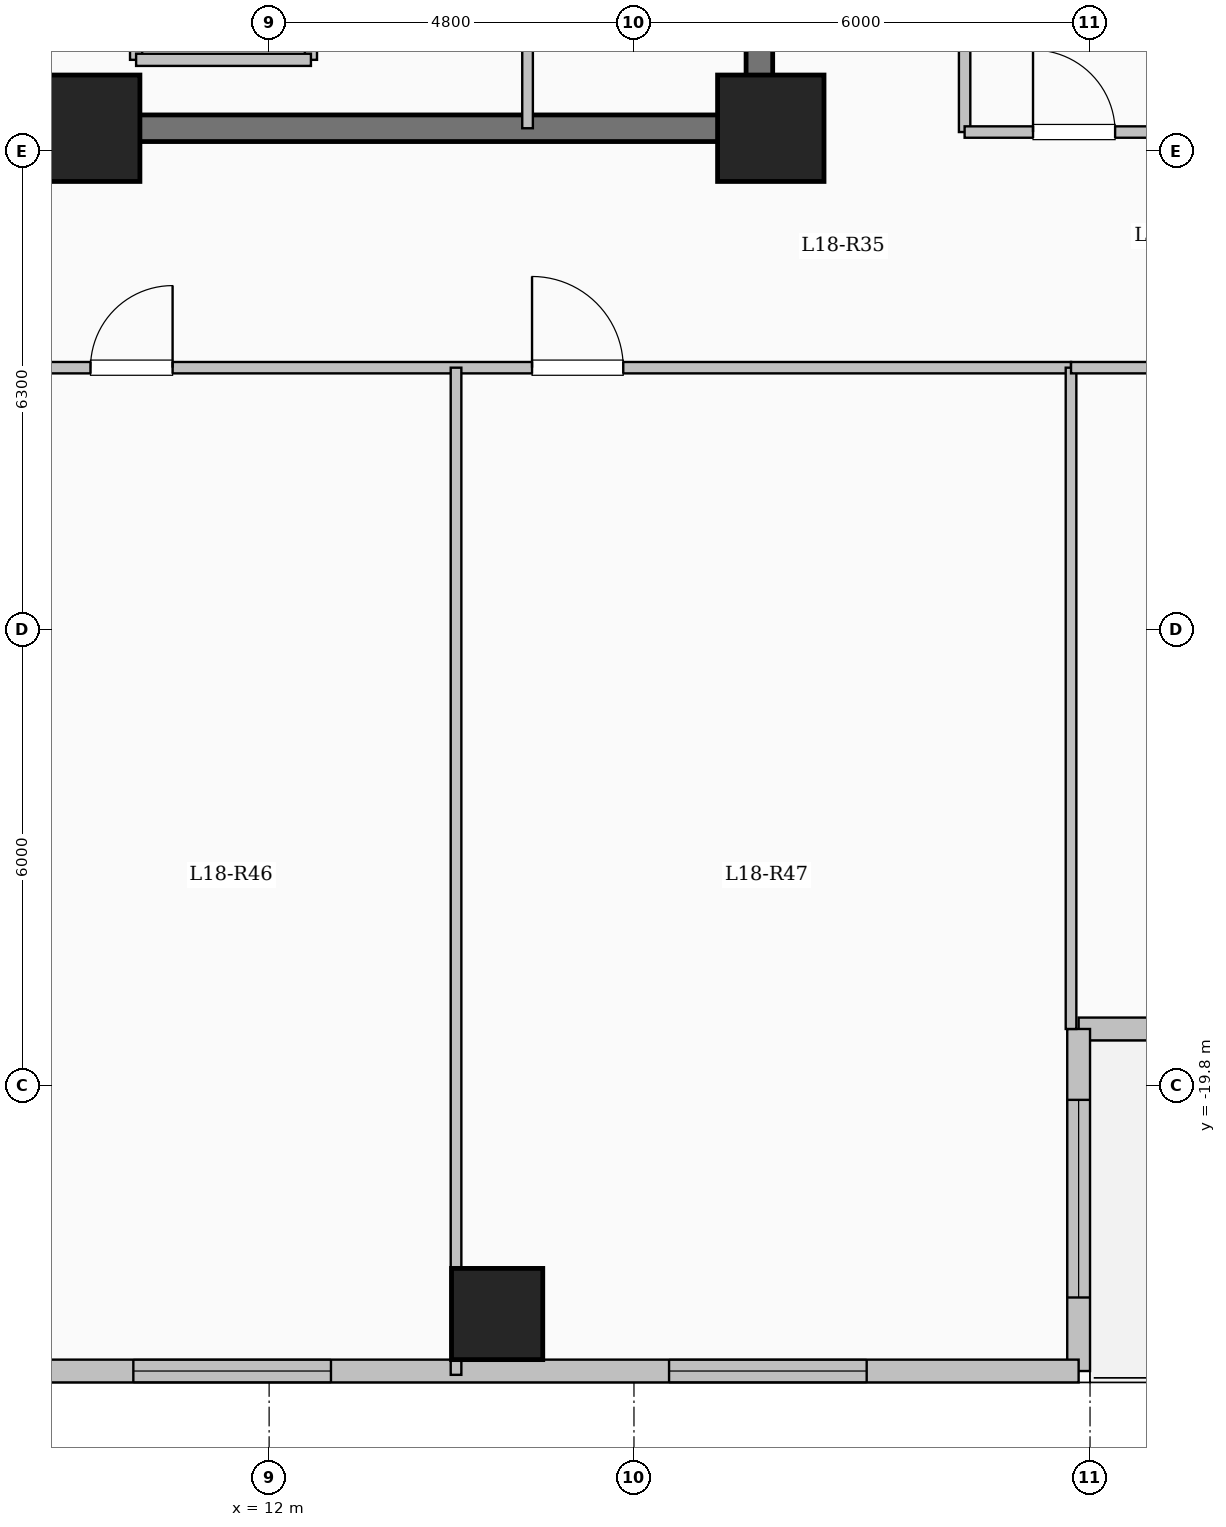
"""IFC4 building model, lengths in metres.
Left out: names, types, materials, properties, quantities, classifications, styles, units other than length and angle.
Written with IfcOpenShell. Run it as: python <this file> out.ifc"""

import sys

from ifc_helpers import new_model, si_unit, direction, frame, frame_2d, origin, origin_2d, place, context, subcontext, project, spatial, rectangle, extrude, element, fill, save


model = new_model("IFC4")
c1 = context("Model", 3, precision=1e-05, world=origin(), true_north=direction((0.0, 1.0)))
c2 = subcontext(c1, "Body", "Model", "MODEL_VIEW")
j1 = project(units=[si_unit("LENGTHUNIT", "METRE"), si_unit("PLANEANGLEUNIT", "RADIAN")], contexts=[c1])
p1 = place(None, origin())
s1 = spatial("IfcSite", under=j1, at=p1, CompositionType="ELEMENT")
p2 = place(p1, origin())
s2 = spatial("IfcBuilding", under=s1, at=p2, CompositionType="ELEMENT")
p3 = place(p2, frame((0.0, 0.0, 68.7)))
s3 = spatial("IfcBuildingStorey", under=s2, at=p3, CompositionType="ELEMENT", Elevation=68.7)
for number, where, z_axis, x_axis in (
    (1, (9.6, -7.2, 0.0), (0.0, 0.0, 1.0), (1.0, 0.0, 0.0)),
    (2, (18.6, -7.2, 0.0), (0.0, 0.0, 1.0), (1.0, 0.0, 0.0)),
):
    element("IfcColumn", number, at=place(p3, frame(where, z_axis=z_axis, x_axis=x_axis)), inside=s3, PredefinedType="COLUMN", context=c2, shape_type="SweptSolid", body=[
        extrude(rectangle(XDim=1.4, YDim=1.4, at=origin_2d()), origin(), (0.0, 0.0, 1.0), 4.5),
    ])
p4 = place(p3, frame((15.0, -22.8, 0.0), z_axis=(0.0, 0.0, 1.0), x_axis=(1.0, 0.0, 0.0)))
e3 = element("IfcColumn", 3, at=p4, inside=s3, PredefinedType="COLUMN", context=c2, shape_type="SweptSolid", body=[
    extrude(rectangle(XDim=1.2, YDim=1.2, at=origin_2d()), origin(), (0.0, 0.0, 1.0), 4.5),
])
p5 = place(p3, frame((28.65, -19.05, 0.0), z_axis=(0.0, 0.0, 1.0), x_axis=(-1.0, 0.0, 0.0)))
e4 = element("IfcWall", 4, at=p5, inside=s3, PredefinedType="SOLIDWALL", context=c2, shape_type="SweptSolid", body=[
    extrude(rectangle(XDim=6.0, YDim=0.3, at=frame_2d((3.0, 0.0))), origin(), (0.0, 0.0, 1.0), 4.2),
])
p6 = place(p5, frame((2.5, 0.0, 0.0)))
e5 = element("IfcOpeningElement", 5, at=p6, cuts=e4, PredefinedType="OPENING", context=c2, shape_type="SweptSolid", body=[
    extrude(rectangle(XDim=1.1, YDim=2.2, at=frame_2d((0.55, 1.1))), frame((0.0, 0.16, 0.0), z_axis=(0.0, -1.0, 0.0), x_axis=(1.0, 0.0, 0.0)), (0.0, 0.0, 1.0), 0.32),
])
p7 = place(p5, frame((0.755, 0.0, 0.95)))
e6 = element("IfcOpeningElement", 6, at=p7, cuts=e4, PredefinedType="OPENING", context=c2, shape_type="SweptSolid", body=[
    extrude(rectangle(XDim=1.2, YDim=1.5, at=frame_2d((0.6, 0.75))), frame((0.0, 0.16, 0.0), z_axis=(0.0, -1.0, 0.0), x_axis=(1.0, 0.0, 0.0)), (0.0, 0.0, 1.0), 0.32),
])
p8 = place(p3, frame((22.65, -19.05, 0.0), z_axis=(0.0, 0.0, 1.0), x_axis=(0.0, -1.0, 0.0)))
e7 = element("IfcWall", 7, at=p8, inside=s3, PredefinedType="SOLIDWALL", context=c2, shape_type="SweptSolid", body=[
    extrude(rectangle(XDim=4.5, YDim=0.3, at=frame_2d((2.25, 0.0))), origin(), (0.0, 0.0, 1.0), 4.2),
])
p9 = place(p8, frame((0.933, 0.0, 0.85)))
e8 = element("IfcOpeningElement", 8, at=p9, cuts=e7, PredefinedType="OPENING", context=c2, shape_type="SweptSolid", body=[
    extrude(rectangle(XDim=2.6, YDim=2.4, at=frame_2d((1.3, 1.2))), frame((0.0, 0.16, 0.0), z_axis=(0.0, -1.0, 0.0), x_axis=(1.0, 0.0, 0.0)), (0.0, 0.0, 1.0), 0.32),
])
p10 = place(p3, frame((22.65, -23.55, 0.0), z_axis=(0.0, 0.0, 1.0), x_axis=(-1.0, 0.0, 0.0)))
e9 = element("IfcWall", 9, at=p10, inside=s3, PredefinedType="SOLIDWALL", context=c2, shape_type="SweptSolid", body=[
    extrude(rectangle(XDim=15.3, YDim=0.3, at=frame_2d((7.65, 0.0))), origin(), (0.0, 0.0, 1.0), 4.2),
])
p11 = place(p10, frame((2.788, 0.0, 0.85)))
e10 = element("IfcOpeningElement", 10, at=p11, cuts=e9, PredefinedType="OPENING", context=c2, shape_type="SweptSolid", body=[
    extrude(rectangle(XDim=2.6, YDim=2.4, at=frame_2d((1.3, 1.2))), frame((0.0, 0.16, 0.0), z_axis=(0.0, -1.0, 0.0), x_axis=(1.0, 0.0, 0.0)), (0.0, 0.0, 1.0), 0.32),
])
p12 = place(p10, frame((9.836, 0.0, 0.85)))
e11 = element("IfcOpeningElement", 11, at=p12, cuts=e9, PredefinedType="OPENING", context=c2, shape_type="SweptSolid", body=[
    extrude(rectangle(XDim=2.6, YDim=2.4, at=frame_2d((1.3, 1.2))), frame((0.0, 0.16, 0.0), z_axis=(0.0, -1.0, 0.0), x_axis=(1.0, 0.0, 0.0)), (0.0, 0.0, 1.0), 0.32),
])
p13 = place(p10, frame((14.303, 0.0, 0.95)))
e12 = element("IfcOpeningElement", 12, at=p13, cuts=e9, PredefinedType="OPENING", context=c2, shape_type="SweptSolid", body=[
    extrude(rectangle(XDim=0.85, YDim=1.5, at=frame_2d((0.425, 0.75))), frame((0.0, 0.16, 0.0), z_axis=(0.0, -1.0, 0.0), x_axis=(1.0, 0.0, 0.0)), (0.0, 0.0, 1.0), 0.32),
])
p14 = place(p3, frame((10.25, -6.3, 0.0), z_axis=(0.0, 0.0, 1.0), x_axis=(0.0, 1.0, 0.0)))
e13 = element("IfcWall", 13, at=p14, inside=s3, PredefinedType="SOLIDWALL", context=c2, shape_type="SweptSolid", body=[
    extrude(rectangle(XDim=2.6, YDim=0.16, at=frame_2d((1.3, 0.0))), origin(), (0.0, 0.0, 1.0), 4.2),
])
p15 = place(p14, frame((0.75, 0.0, 0.0)))
e14 = element("IfcOpeningElement", 14, at=p15, cuts=e13, PredefinedType="OPENING", context=c2, shape_type="SweptSolid", body=[
    extrude(rectangle(XDim=1.1, YDim=2.15, at=frame_2d((0.55, 1.075))), frame((0.0, 0.09, 0.0), z_axis=(0.0, -1.0, 0.0), x_axis=(1.0, 0.0, 0.0)), (0.0, 0.0, 1.0), 0.18),
])
p16 = place(p3, frame((12.55, -6.3, 0.0), z_axis=(0.0, 0.0, 1.0), x_axis=(0.0, 1.0, 0.0)))
e15 = element("IfcWall", 15, at=p16, inside=s3, PredefinedType="SOLIDWALL", context=c2, shape_type="SweptSolid", body=[
    extrude(rectangle(XDim=2.6, YDim=0.16, at=frame_2d((1.3, 0.0))), origin(), (0.0, 0.0, 1.0), 4.2),
])
p17 = place(p3, frame((10.25, -6.3, 0.0), z_axis=(0.0, 0.0, 1.0), x_axis=(1.0, 0.0, 0.0)))
e16 = element("IfcWall", 16, at=p17, inside=s3, PredefinedType="SOLIDWALL", context=c2, shape_type="SweptSolid", body=[
    extrude(rectangle(XDim=2.3, YDim=0.16, at=frame_2d((1.15, 0.0))), origin(), (0.0, 0.0, 1.0), 4.2),
])
p18 = place(p3, frame((18.45, -7.375, 0.0), z_axis=(0.0, 0.0, 1.0), x_axis=(0.0, 1.0, 0.0)))
e17 = element("IfcWall", 17, at=p18, inside=s3, PredefinedType="SHEAR", context=c2, shape_type="SweptSolid", body=[
    extrude(rectangle(XDim=14.05, YDim=0.35, at=frame_2d((7.025, 0.0))), origin(), (0.0, 0.0, 1.0), 4.5),
])
p19 = place(p3, frame((10.075, -7.2, 0.0), z_axis=(0.0, 0.0, 1.0), x_axis=(1.0, 0.0, 0.0)))
e18 = element("IfcWall", 18, at=p19, inside=s3, PredefinedType="SHEAR", context=c2, shape_type="SweptSolid", body=[
    extrude(rectangle(XDim=8.55, YDim=0.35, at=frame_2d((4.275, 0.0))), origin(), (0.0, 0.0, 1.0), 4.5),
])
p20 = place(p3, frame((15.4, -7.2, 0.0), z_axis=(0.0, 0.0, 1.0), x_axis=(0.0, 1.0, 0.0)))
e19 = element("IfcWall", 19, at=p20, inside=s3, PredefinedType="PARTITIONING", context=c2, shape_type="SweptSolid", body=[
    extrude(rectangle(XDim=10.45, YDim=0.14, at=frame_2d((5.225, 0.0))), origin(), (0.0, 0.0, 1.0), 4.2),
])
p21 = place(p20, frame((9.25, 0.0, 0.0)))
e20 = element("IfcOpeningElement", 20, at=p21, cuts=e19, PredefinedType="OPENING", context=c2, shape_type="SweptSolid", body=[
    extrude(rectangle(XDim=0.9, YDim=2.08, at=frame_2d((0.45, 1.04))), frame((0.0, 0.08, 0.0), z_axis=(0.0, -1.0, 0.0), x_axis=(1.0, 0.0, 0.0)), (0.0, 0.0, 1.0), 0.16),
])
p22 = place(p3, frame((21.15, -7.25, 0.0), z_axis=(0.0, 0.0, 1.0), x_axis=(0.0, 1.0, 0.0)))
e21 = element("IfcWall", 21, at=p22, inside=s3, PredefinedType="PARTITIONING", context=c2, shape_type="SweptSolid", body=[
    extrude(rectangle(XDim=18.0, YDim=0.15, at=frame_2d((9.0, 0.0))), origin(), (0.0, 0.0, 1.0), 3.635),
])
p23 = place(p3, frame((8.55, -10.35, 0.0), z_axis=(0.0, 0.0, 1.0), x_axis=(1.0, 0.0, 0.0)))
e22 = element("IfcWall", 22, at=p23, inside=s3, PredefinedType="PARTITIONING", context=c2, shape_type="SweptSolid", body=[
    extrude(rectangle(XDim=14.0, YDim=0.15, at=frame_2d((7.0, 0.0))), origin(), (0.0, 0.0, 1.0), 4.2),
])
p24 = place(p23, frame((1.1, 0.0, 0.0)))
e23 = element("IfcOpeningElement", 23, at=p24, cuts=e22, PredefinedType="OPENING", context=c2, shape_type="SweptSolid", body=[
    extrude(rectangle(XDim=1.08, YDim=2.15, at=frame_2d((0.54, 1.075))), frame((0.0, 0.085, 0.0), z_axis=(0.0, -1.0, 0.0), x_axis=(1.0, 0.0, 0.0)), (0.0, 0.0, 1.0), 0.17),
])
p25 = place(p23, frame((6.909, 0.0, 0.0)))
e24 = element("IfcOpeningElement", 24, at=p25, cuts=e22, PredefinedType="OPENING", context=c2, shape_type="SweptSolid", body=[
    extrude(rectangle(XDim=1.2, YDim=2.15, at=frame_2d((0.6, 1.075))), frame((0.0, 0.085, 0.0), z_axis=(0.0, -1.0, 0.0), x_axis=(1.0, 0.0, 0.0)), (0.0, 0.0, 1.0), 0.17),
])
p26 = place(p3, frame((14.459, -23.6, 0.0), z_axis=(0.0, 0.0, 1.0), x_axis=(0.0, 1.0, 0.0)))
e25 = element("IfcWall", 25, at=p26, inside=s3, PredefinedType="PARTITIONING", context=c2, shape_type="SweptSolid", body=[
    extrude(rectangle(XDim=13.25, YDim=0.14, at=frame_2d((6.625, 0.0))), origin(), (0.0, 0.0, 1.0), 4.2),
])
p27 = place(p3, frame((21.15, -7.25, 0.0), z_axis=(0.0, 0.0, 1.0), x_axis=(1.0, 0.0, 0.0)))
e26 = element("IfcWall", 26, at=p27, inside=s3, PredefinedType="PARTITIONING", context=c2, shape_type="SweptSolid", body=[
    extrude(rectangle(XDim=7.53, YDim=0.15, at=frame_2d((3.765, 0.0))), origin(), (0.0, 0.0, 1.0), 4.2),
])
p28 = place(p27, frame((0.9, 0.0, 0.0)))
e27 = element("IfcOpeningElement", 27, at=p28, cuts=e26, PredefinedType="OPENING", context=c2, shape_type="SweptSolid", body=[
    extrude(rectangle(XDim=1.08, YDim=2.15, at=frame_2d((0.54, 1.075))), frame((0.0, 0.085, 0.0), z_axis=(0.0, -1.0, 0.0), x_axis=(1.0, 0.0, 0.0)), (0.0, 0.0, 1.0), 0.17),
])
p29 = place(p3, frame((22.55, -19.05, 0.0), z_axis=(0.0, 0.0, 1.0), x_axis=(0.0, 1.0, 0.0)))
e28 = element("IfcWall", 28, at=p29, inside=s3, PredefinedType="PARTITIONING", context=c2, shape_type="SweptSolid", body=[
    extrude(rectangle(XDim=8.7, YDim=0.14, at=frame_2d((4.35, 0.0))), origin(), (0.0, 0.0, 1.0), 4.2),
])
p30 = place(p3, frame((22.55, -10.35, 0.0), z_axis=(0.0, 0.0, 1.0), x_axis=(1.0, 0.0, 0.0)))
e29 = element("IfcWall", 29, at=p30, inside=s3, PredefinedType="PARTITIONING", context=c2, shape_type="SweptSolid", body=[
    extrude(rectangle(XDim=6.13, YDim=0.15, at=frame_2d((3.065, 0.0))), origin(), (0.0, 0.0, 1.0), 4.2),
])
p31 = place(p30, frame((2.59, 0.0, 0.0)))
e30 = element("IfcOpeningElement", 30, at=p31, cuts=e29, PredefinedType="OPENING", context=c2, shape_type="SweptSolid", body=[
    extrude(rectangle(XDim=0.95, YDim=2.15, at=frame_2d((0.475, 1.075))), frame((0.0, 0.085, 0.0), z_axis=(0.0, -1.0, 0.0), x_axis=(1.0, 0.0, 0.0)), (0.0, 0.0, 1.0), 0.17),
])
p32 = place(p9, origin())
e31 = element("IfcWindow", 31, at=p32, inside=s3, PartitioningType="SINGLE_PANEL", PredefinedType="WINDOW", context=c2, shape_type="SweptSolid", body=[
    extrude(rectangle(XDim=2.6, YDim=2.4, at=frame_2d((1.3, 1.2))), frame((0.0, 0.03, 0.0), z_axis=(0.0, -1.0, 0.0), x_axis=(1.0, 0.0, 0.0)), (0.0, 0.0, 1.0), 0.06),
])
fill(e8, e31)
p33 = place(p11, origin())
e32 = element("IfcWindow", 32, at=p33, inside=s3, PartitioningType="SINGLE_PANEL", PredefinedType="WINDOW", context=c2, shape_type="SweptSolid", body=[
    extrude(rectangle(XDim=2.6, YDim=2.4, at=frame_2d((1.3, 1.2))), frame((0.0, 0.03, 0.0), z_axis=(0.0, -1.0, 0.0), x_axis=(1.0, 0.0, 0.0)), (0.0, 0.0, 1.0), 0.06),
])
fill(e10, e32)
p34 = place(p12, origin())
e33 = element("IfcWindow", 33, at=p34, inside=s3, PartitioningType="SINGLE_PANEL", PredefinedType="WINDOW", context=c2, shape_type="SweptSolid", body=[
    extrude(rectangle(XDim=2.6, YDim=2.4, at=frame_2d((1.3, 1.2))), frame((0.0, 0.03, 0.0), z_axis=(0.0, -1.0, 0.0), x_axis=(1.0, 0.0, 0.0)), (0.0, 0.0, 1.0), 0.06),
])
fill(e11, e33)
p35 = place(p24, origin())
e34 = element("IfcDoor", 34, at=p35, inside=s3, OperationType="SINGLE_SWING_RIGHT", PredefinedType="DOOR", context=c2, shape_type="SweptSolid", body=[
    extrude(rectangle(XDim=1.08, YDim=2.15, at=frame_2d((0.54, 1.075))), frame((0.0, 0.025, 0.0), z_axis=(0.0, -1.0, 0.0), x_axis=(1.0, 0.0, 0.0)), (0.0, 0.0, 1.0), 0.05),
])
fill(e23, e34)
p36 = place(p25, origin())
e35 = element("IfcDoor", 35, at=p36, inside=s3, OperationType="SINGLE_SWING_LEFT", PredefinedType="DOOR", context=c2, shape_type="SweptSolid", body=[
    extrude(rectangle(XDim=1.2, YDim=2.15, at=frame_2d((0.6, 1.075))), frame((0.0, 0.025, 0.0), z_axis=(0.0, -1.0, 0.0), x_axis=(1.0, 0.0, 0.0)), (0.0, 0.0, 1.0), 0.05),
])
fill(e24, e35)
p37 = place(p28, origin())
e36 = element("IfcDoor", 36, at=p37, inside=s3, OperationType="SINGLE_SWING_LEFT", PredefinedType="DOOR", context=c2, shape_type="SweptSolid", body=[
    extrude(rectangle(XDim=1.08, YDim=2.15, at=frame_2d((0.54, 1.075))), frame((0.0, 0.025, 0.0), z_axis=(0.0, -1.0, 0.0), x_axis=(1.0, 0.0, 0.0)), (0.0, 0.0, 1.0), 0.05),
])
fill(e27, e36)
save(model, sys.argv[1])
